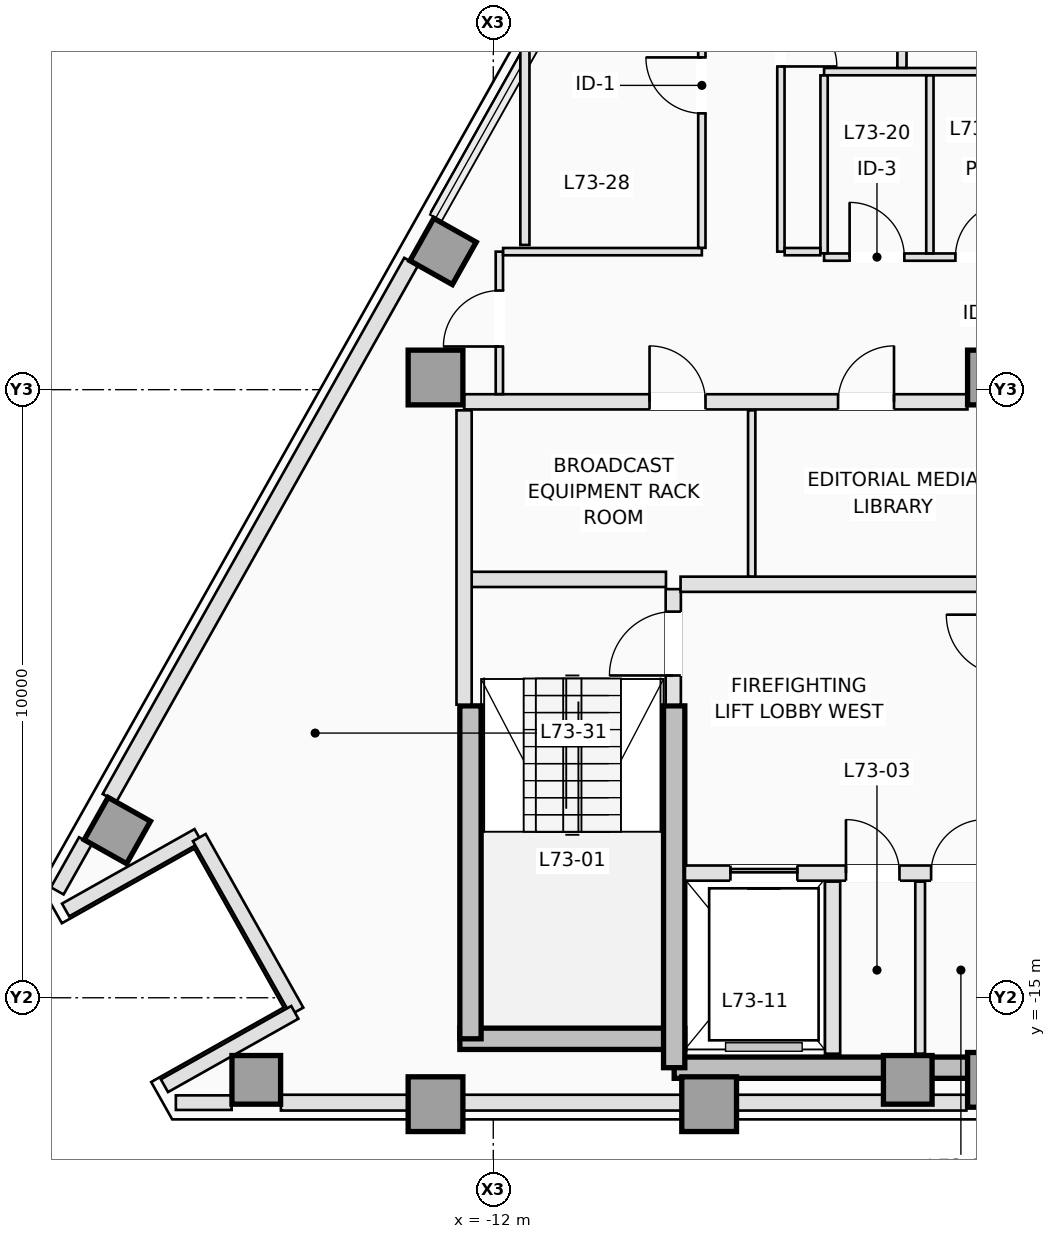
"""IFC4 building model, lengths in metres.
Left out: names, types, materials, properties, quantities, classifications, styles, units other than length and angle.
Written with IfcOpenShell. Run it as: python <this file> out.ifc"""

import sys

from ifc_helpers import new_model, si_unit, direction, frame, frame_2d, origin, origin_2d, place, context, subcontext, project, spatial, rectangle, extrude, element, fill, save


model = new_model("IFC4")
c1 = context("Model", 3, precision=1e-05, world=origin(), true_north=direction((0.0, 1.0)))
c2 = subcontext(c1, "Body", "Model", "MODEL_VIEW")
j1 = project(units=[si_unit("LENGTHUNIT", "METRE"), si_unit("PLANEANGLEUNIT", "RADIAN")], contexts=[c1])
p1 = place(None, origin())
s1 = spatial("IfcSite", under=j1, at=p1, CompositionType="ELEMENT")
p2 = place(p1, origin())
s2 = spatial("IfcBuilding", under=s1, at=p2, CompositionType="ELEMENT")
p3 = place(p2, frame((0.0, 0.0, 263.9)))
s3 = spatial("IfcBuildingStorey", under=s2, at=p3, CompositionType="ELEMENT", Elevation=263.9)
p4 = place(p3, frame((-12.55, -15.675, 0.0), z_axis=(0.0, 0.0, 1.0), x_axis=(1.0, 0.0, 0.0)))
e1 = element("IfcWall", 1, at=p4, inside=s3, PredefinedType="SHEAR", context=c2, shape_type="SweptSolid", body=[
    extrude(rectangle(XDim=3.7, YDim=0.35, at=frame_2d((1.85, 0.0))), origin(), (0.0, 0.0, 1.0), 3.5),
])
p5 = place(p3, frame((-9.025, -16.15, 0.0), z_axis=(0.0, 0.0, 1.0), x_axis=(1.0, 0.0, 0.0)))
e2 = element("IfcWall", 2, at=p5, inside=s3, PredefinedType="SHEAR", context=c2, shape_type="SweptSolid", body=[
    extrude(rectangle(XDim=5.275, YDim=0.35, at=frame_2d((2.637, 0.0))), origin(), (0.0, 0.0, 1.0), 3.5),
])
p6 = place(p3, frame((-12.375, -15.675, 0.0), z_axis=(0.0, 0.0, 1.0), x_axis=(0.0, 1.0, 0.0)))
e3 = element("IfcWall", 3, at=p6, inside=s3, PredefinedType="SHEAR", context=c2, shape_type="SweptSolid", body=[
    extrude(rectangle(XDim=5.475, YDim=0.35, at=frame_2d((2.738, 0.0))), origin(), (0.0, 0.0, 1.0), 3.5),
])
p7 = place(p3, frame((-9.025, -16.15, 0.0), z_axis=(0.0, 0.0, 1.0), x_axis=(0.0, 1.0, 0.0)))
e4 = element("IfcWall", 4, at=p7, inside=s3, PredefinedType="SHEAR", context=c2, shape_type="SweptSolid", body=[
    extrude(rectangle(XDim=5.95, YDim=0.35, at=frame_2d((2.975, 0.0))), origin(), (0.0, 0.0, 1.0), 3.5),
])
for number, where, z_axis, x_axis in (
    (5, (-12.95, -16.75, 0.0), (0.0, 0.0, 1.0), (1.0, 0.0, 0.0)),
    (6, (-8.45, -16.75, 0.0), (0.0, 0.0, 1.0), (1.0, 0.0, 0.0)),
    (7, (-3.75, -16.35, 0.0), (0.0, 0.0, 1.0), (1.0, 0.0, 0.0)),
    (8, (-12.95, -4.8, 0.0), (0.0, 0.0, 1.0), (1.0, 0.0, 0.0)),
    (9, (-3.75, -4.8, 0.0), (0.0, 0.0, 1.0), (1.0, 0.0, 0.0)),
):
    element("IfcColumn", number, at=place(p3, frame(where, z_axis=z_axis, x_axis=x_axis)), inside=s3, PredefinedType="COLUMN", context=c2, shape_type="SweptSolid", body=[
        extrude(rectangle(XDim=0.9, YDim=0.9, at=origin_2d()), origin(), (0.0, 0.0, 1.0), 3.5),
    ])
for number, where, z_axis, x_axis in (
    (10, (-15.898, -16.35, 0.0), (0.0, 0.0, 1.0), (0.0, 1.0, 0.0)),
    (11, (-5.184, -16.35, 0.0), (0.0, 0.0, 1.0), (0.0, 1.0, 0.0)),
    (12, (-12.825, -2.727, 0.0), (0.0, 0.0, 1.0), (-0.872, 0.49, 0.0)),
    (13, (-18.182, -12.25, 0.0), (0.0, 0.0, 1.0), (-0.872, 0.49, 0.0)),
):
    element("IfcColumn", number, at=place(p3, frame(where, z_axis=z_axis, x_axis=x_axis)), inside=s3, PredefinedType="COLUMN", context=c2, shape_type="SweptSolid", body=[
        extrude(rectangle(XDim=0.8, YDim=0.8, at=origin_2d()), origin(), (0.0, 0.0, 1.0), 3.5),
    ])
p8 = place(p3, frame((-16.302, -16.725, 0.0), z_axis=(0.0, 0.0, 1.0), x_axis=(-1.0, 0.0, 0.0)))
e14 = element("IfcWall", 14, at=p8, inside=s3, PredefinedType="STANDARD", context=c2, shape_type="SweptSolid", body=[
    extrude(rectangle(XDim=0.917, YDim=0.24, at=frame_2d((0.459, 0.0))), origin(), (0.0, 0.0, 1.0), 3.25),
])
p9 = place(p3, frame((-4.22, -16.725, 0.0), z_axis=(0.0, 0.0, 1.0), x_axis=(-1.0, 0.0, 0.0)))
e15 = element("IfcWall", 15, at=p9, inside=s3, PredefinedType="STANDARD", context=c2, shape_type="SweptSolid", body=[
    extrude(rectangle(XDim=11.273, YDim=0.26, at=frame_2d((5.636, 0.0))), origin(), (0.0, 0.0, 1.0), 2.79),
])
p10 = place(p3, frame((-19.171, -13.242, 0.0), z_axis=(0.0, 0.0, 1.0), x_axis=(0.490199895283, 0.871610040479, 0.0)))
e16 = element("IfcWall", 16, at=p10, inside=s3, PredefinedType="STANDARD", context=c2, shape_type="SweptSolid", body=[
    extrude(rectangle(XDim=0.945, YDim=0.24, at=frame_2d((0.472, 0.0))), origin(), (0.0, 0.0, 1.0), 3.25),
])
p11 = place(p3, frame((-18.311, -11.713, 0.0), z_axis=(0.0, 0.0, 1.0), x_axis=(0.490266968583, 0.871572314565, 0.0)))
e17 = element("IfcWall", 17, at=p11, inside=s3, PredefinedType="STANDARD", context=c2, shape_type="SweptSolid", body=[
    extrude(rectangle(XDim=10.116, YDim=0.26, at=frame_2d((5.058, 0.0))), origin(), (0.0, 0.0, 1.0), 3.25),
])
p12 = place(p3, frame((-19.033, -13.556, 0.0), z_axis=(0.0, 0.0, 1.0), x_axis=(0.871588577066, 0.490238056792, 0.0)))
e18 = element("IfcWall", 18, at=p12, inside=s3, PredefinedType="STANDARD", context=c2, shape_type="SweptSolid", body=[
    extrude(rectangle(XDim=2.5, YDim=0.24, at=frame_2d((1.25, 0.0))), origin(), (0.0, 0.0, 1.0), 3.25),
])
p13 = place(p3, frame((-16.835, -12.366, 0.0), z_axis=(0.0, 0.0, 1.0), x_axis=(0.490293083368, -0.871557624258, 0.0)))
e19 = element("IfcWall", 19, at=p13, inside=s3, PredefinedType="STANDARD", context=c2, shape_type="SweptSolid", body=[
    extrude(rectangle(XDim=3.276, YDim=0.24, at=frame_2d((1.638, 0.0))), origin(), (0.0, 0.0, 1.0), 2.79),
])
p14 = place(p3, frame((-15.264, -15.24, 0.0), z_axis=(0.0, 0.0, 1.0), x_axis=(-0.87157023615, -0.490270663468, 0.0)))
e20 = element("IfcWall", 20, at=p14, inside=s3, PredefinedType="STANDARD", context=c2, shape_type="SweptSolid", body=[
    extrude(rectangle(XDim=2.46, YDim=0.24, at=frame_2d((1.23, 0.0))), origin(), (0.0, 0.0, 1.0), 3.25),
])
p15 = place(p3, frame((-9.04, -10.18, 0.0), z_axis=(0.0, 0.0, 1.0), x_axis=(0.0, 1.0, 0.0)))
e21 = element("IfcWall", 21, at=p15, inside=s3, PredefinedType="PARTITIONING", context=c2, shape_type="SweptSolid", body=[
    extrude(rectangle(XDim=1.9, YDim=0.25, at=frame_2d((0.95, 0.0))), origin(), (0.0, 0.0, 1.0), 3.25),
])
p16 = place(p15, frame((0.48, 0.0, 0.0)))
e22 = element("IfcOpeningElement", 22, at=p16, cuts=e21, PredefinedType="OPENING", context=c2, shape_type="SweptSolid", body=[
    extrude(rectangle(XDim=1.05, YDim=2.15, at=frame_2d((0.525, 1.075))), frame((0.0, 0.135, 0.0), z_axis=(0.0, -1.0, 0.0), x_axis=(1.0, 0.0, 0.0)), (0.0, 0.0, 1.0), 0.27),
])
p17 = place(p3, frame((-12.38, -8.12, 0.0), z_axis=(0.0, 0.0, 1.0), x_axis=(1.0, 0.0, 0.0)))
e23 = element("IfcWall", 23, at=p17, inside=s3, PredefinedType="PARTITIONING", context=c2, shape_type="SweptSolid", body=[
    extrude(rectangle(XDim=3.22, YDim=0.25, at=frame_2d((1.61, 0.0))), origin(), (0.0, 0.0, 1.0), 3.25),
])
p18 = place(p3, frame((-12.48, -10.18, 0.0), z_axis=(0.0, 0.0, 1.0), x_axis=(0.0, 1.0, 0.0)))
e24 = element("IfcWall", 24, at=p18, inside=s3, PredefinedType="PARTITIONING", context=c2, shape_type="SweptSolid", body=[
    extrude(rectangle(XDim=4.84, YDim=0.25, at=frame_2d((2.42, 0.0))), origin(), (0.0, 0.0, 1.0), 3.25),
])
p19 = place(p3, frame((-8.848, -12.95, 0.0), z_axis=(0.0, 0.0, 1.0), x_axis=(1.0, 0.0, 0.0)))
e25 = element("IfcWall", 25, at=p19, inside=s3, PredefinedType="PARTITIONING", context=c2, shape_type="SweptSolid", body=[
    extrude(rectangle(XDim=5.168, YDim=0.25, at=frame_2d((2.584, 0.0))), origin(), (0.0, 0.0, 1.0), 3.25),
])
p20 = place(p19, frame((0.748, 0.0, 0.0)))
e26 = element("IfcOpeningElement", 26, at=p20, cuts=e25, PredefinedType="OPENING", context=c2, shape_type="SweptSolid", body=[
    extrude(rectangle(XDim=1.1, YDim=2.15, at=frame_2d((0.55, 1.075))), frame((0.0, 0.135, 0.0), z_axis=(0.0, -1.0, 0.0), x_axis=(1.0, 0.0, 0.0)), (0.0, 0.0, 1.0), 0.27),
])
p21 = place(p19, frame((2.648, 0.0, 0.0)))
e27 = element("IfcOpeningElement", 27, at=p21, cuts=e25, PredefinedType="OPENING", context=c2, shape_type="SweptSolid", body=[
    extrude(rectangle(XDim=0.88, YDim=2.1, at=frame_2d((0.44, 1.05))), frame((0.0, 0.135, 0.0), z_axis=(0.0, -1.0, 0.0), x_axis=(1.0, 0.0, 0.0)), (0.0, 0.0, 1.0), 0.27),
])
p22 = place(p19, frame((4.048, 0.0, 0.0)))
e28 = element("IfcOpeningElement", 28, at=p22, cuts=e25, PredefinedType="OPENING", context=c2, shape_type="SweptSolid", body=[
    extrude(rectangle(XDim=0.88, YDim=2.1, at=frame_2d((0.44, 1.05))), frame((0.0, 0.135, 0.0), z_axis=(0.0, -1.0, 0.0), x_axis=(1.0, 0.0, 0.0)), (0.0, 0.0, 1.0), 0.27),
])
p23 = place(p3, frame((-6.42, -15.92, 0.0), z_axis=(0.0, 0.0, 1.0), x_axis=(0.0, 1.0, 0.0)))
e29 = element("IfcWall", 29, at=p23, inside=s3, PredefinedType="PARTITIONING", context=c2, shape_type="SweptSolid", body=[
    extrude(rectangle(XDim=2.83, YDim=0.25, at=frame_2d((1.415, 0.0))), origin(), (0.0, 0.0, 1.0), 3.25),
])
p24 = place(p3, frame((-4.98, -15.92, 0.0), z_axis=(0.0, 0.0, 1.0), x_axis=(0.0, 1.0, 0.0)))
e30 = element("IfcWall", 30, at=p24, inside=s3, PredefinedType="PARTITIONING", context=c2, shape_type="SweptSolid", body=[
    extrude(rectangle(XDim=2.83, YDim=0.16, at=frame_2d((1.415, 0.0))), origin(), (0.0, 0.0, 1.0), 3.25),
])
p25 = place(p3, frame((-8.92, -8.2, 0.0), z_axis=(0.0, 0.0, 1.0), x_axis=(1.0, 0.0, 0.0)))
e31 = element("IfcWall", 31, at=p25, inside=s3, PredefinedType="PARTITIONING", context=c2, shape_type="SweptSolid", body=[
    extrude(rectangle(XDim=5.24, YDim=0.25, at=frame_2d((2.62, 0.0))), origin(), (0.0, 0.0, 1.0), 3.25),
])
p26 = place(p3, frame((-12.48, -5.2, 0.0), z_axis=(0.0, 0.0, 1.0), x_axis=(1.0, 0.0, 0.0)))
e32 = element("IfcWall", 32, at=p26, inside=s3, PredefinedType="PARTITIONING", context=c2, shape_type="SweptSolid", body=[
    extrude(rectangle(XDim=8.278, YDim=0.25, at=frame_2d((4.139, 0.0))), origin(), (0.0, 0.0, 1.0), 3.25),
])
p27 = place(p26, frame((3.05, 0.0, 0.0)))
e33 = element("IfcOpeningElement", 33, at=p27, cuts=e32, PredefinedType="OPENING", context=c2, shape_type="SweptSolid", body=[
    extrude(rectangle(XDim=0.92, YDim=2.12, at=frame_2d((0.46, 1.06))), frame((0.0, 0.135, 0.0), z_axis=(0.0, -1.0, 0.0), x_axis=(1.0, 0.0, 0.0)), (0.0, 0.0, 1.0), 0.27),
])
p28 = place(p26, frame((6.15, 0.0, 0.0)))
e34 = element("IfcOpeningElement", 34, at=p28, cuts=e32, PredefinedType="OPENING", context=c2, shape_type="SweptSolid", body=[
    extrude(rectangle(XDim=0.92, YDim=2.12, at=frame_2d((0.46, 1.06))), frame((0.0, 0.135, 0.0), z_axis=(0.0, -1.0, 0.0), x_axis=(1.0, 0.0, 0.0)), (0.0, 0.0, 1.0), 0.27),
])
p29 = place(p3, frame((-7.75, -8.073, 0.0), z_axis=(0.0, 0.0, 1.0), x_axis=(0.0, 1.0, 0.0)))
e35 = element("IfcWall", 35, at=p29, inside=s3, PredefinedType="PARTITIONING", context=c2, shape_type="SweptSolid", body=[
    extrude(rectangle(XDim=2.733, YDim=0.12, at=frame_2d((1.366, 0.0))), origin(), (0.0, 0.0, 1.0), 3.25),
])
p30 = place(p3, frame((-6.56, -2.82, 0.0), z_axis=(0.0, 0.0, 1.0), x_axis=(1.0, 0.0, 0.0)))
e36 = element("IfcWall", 36, at=p30, inside=s3, PredefinedType="PARTITIONING", context=c2, shape_type="SweptSolid", body=[
    extrude(rectangle(XDim=5.32, YDim=0.12, at=frame_2d((2.66, 0.0))), origin(), (0.0, 0.0, 1.0), 2.943),
])
p31 = place(p30, frame((0.42, 0.0, 0.0)))
e37 = element("IfcOpeningElement", 37, at=p31, cuts=e36, PredefinedType="OPENING", context=c2, shape_type="SweptSolid", body=[
    extrude(rectangle(XDim=0.9, YDim=2.12, at=frame_2d((0.45, 1.06))), frame((0.0, 0.07, 0.0), z_axis=(0.0, -1.0, 0.0), x_axis=(1.0, 0.0, 0.0)), (0.0, 0.0, 1.0), 0.14),
])
p32 = place(p30, frame((2.16, 0.0, 0.0)))
e38 = element("IfcOpeningElement", 38, at=p32, cuts=e36, PredefinedType="OPENING", context=c2, shape_type="SweptSolid", body=[
    extrude(rectangle(XDim=0.9, YDim=2.12, at=frame_2d((0.45, 1.06))), frame((0.0, 0.07, 0.0), z_axis=(0.0, -1.0, 0.0), x_axis=(1.0, 0.0, 0.0)), (0.0, 0.0, 1.0), 0.14),
])
p33 = place(p30, frame((3.92, 0.0, 0.0)))
e39 = element("IfcOpeningElement", 39, at=p33, cuts=e36, PredefinedType="OPENING", context=c2, shape_type="SweptSolid", body=[
    extrude(rectangle(XDim=0.9, YDim=2.12, at=frame_2d((0.45, 1.06))), frame((0.0, 0.07, 0.0), z_axis=(0.0, -1.0, 0.0), x_axis=(1.0, 0.0, 0.0)), (0.0, 0.0, 1.0), 0.14),
])
p34 = place(p3, frame((-6.56, 0.23, 0.0), z_axis=(0.0, 0.0, 1.0), x_axis=(1.0, 0.0, 0.0)))
e40 = element("IfcWall", 40, at=p34, inside=s3, PredefinedType="PARTITIONING", context=c2, shape_type="SweptSolid", body=[
    extrude(rectangle(XDim=5.32, YDim=0.12, at=frame_2d((2.66, 0.0))), origin(), (0.0, 0.0, 1.0), 3.25),
])
for number, where, z_axis, x_axis in (
    (41, (-6.56, -2.758, 0.0), (0.0, 0.0, 1.0), (0.0, 1.0, 0.0)),
    (42, (-4.82, -2.758, 0.0), (0.0, 0.0, 1.0), (0.0, 1.0, 0.0)),
):
    element("IfcWall", number, at=place(p3, frame(where, z_axis=z_axis, x_axis=x_axis)), inside=s3, PredefinedType="PARTITIONING", context=c2, shape_type="SweptSolid", body=[
        extrude(rectangle(XDim=2.926, YDim=0.12, at=frame_2d((1.463, 0.0))), origin(), (0.0, 0.0, 1.0), 3.25),
    ])
p35 = place(p3, frame((-11.9, -5.073, 0.0), z_axis=(0.0, 0.0, 1.0), x_axis=(0.0, 1.0, 0.0)))
e43 = element("IfcWall", 43, at=p35, inside=s3, PredefinedType="PARTITIONING", context=c2, shape_type="SweptSolid", body=[
    extrude(rectangle(XDim=2.343, YDim=0.12, at=frame_2d((1.171, 0.0))), origin(), (0.0, 0.0, 1.0), 3.25),
])
p36 = place(p35, frame((0.783, 0.0, 0.0)))
e44 = element("IfcOpeningElement", 44, at=p36, cuts=e43, PredefinedType="OPENING", context=c2, shape_type="SweptSolid", body=[
    extrude(rectangle(XDim=0.92, YDim=2.12, at=frame_2d((0.46, 1.06))), frame((0.0, 0.07, 0.0), z_axis=(0.0, -1.0, 0.0), x_axis=(1.0, 0.0, 0.0)), (0.0, 0.0, 1.0), 0.14),
])
p37 = place(p3, frame((-11.838, -2.73, 0.0), z_axis=(0.0, 0.0, 1.0), x_axis=(1.0, 0.0, 0.0)))
e45 = element("IfcWall", 45, at=p37, inside=s3, PredefinedType="PARTITIONING", context=c2, shape_type="SweptSolid", body=[
    extrude(rectangle(XDim=3.268, YDim=0.12, at=frame_2d((1.634, 0.0))), origin(), (0.0, 0.0, 1.0), 3.25),
])
p38 = place(p3, frame((-8.57, -2.668, 0.0), z_axis=(0.0, 0.0, 1.0), x_axis=(0.0, 1.0, 0.0)))
e46 = element("IfcWall", 46, at=p38, inside=s3, PredefinedType="PARTITIONING", context=c2, shape_type="SweptSolid", body=[
    extrude(rectangle(XDim=5.997, YDim=0.12, at=frame_2d((2.999, 0.0))), origin(), (0.0, 0.0, 1.0), 3.25),
])
p39 = place(p38, frame((2.212, 0.0, 0.0)))
e47 = element("IfcOpeningElement", 47, at=p39, cuts=e46, PredefinedType="OPENING", context=c2, shape_type="SweptSolid", body=[
    extrude(rectangle(XDim=0.92, YDim=2.12, at=frame_2d((0.46, 1.06))), frame((0.0, 0.07, 0.0), z_axis=(0.0, -1.0, 0.0), x_axis=(1.0, 0.0, 0.0)), (0.0, 0.0, 1.0), 0.14),
])
p40 = place(p3, frame((-7.27, 3.498, 0.0), z_axis=(0.0, 0.0, 1.0), x_axis=(0.0, -1.0, 0.0)))
e48 = element("IfcWall", 48, at=p40, inside=s3, PredefinedType="PARTITIONING", context=c2, shape_type="SweptSolid", body=[
    extrude(rectangle(XDim=6.228, YDim=0.12, at=frame_2d((3.114, 0.0))), origin(), (0.0, 0.0, 1.0), 3.25),
])
p41 = place(p40, frame((2.263, 0.0, 0.0)))
e49 = element("IfcOpeningElement", 49, at=p41, cuts=e48, PredefinedType="OPENING", context=c2, shape_type="SweptSolid", body=[
    extrude(rectangle(XDim=0.92, YDim=2.12, at=frame_2d((0.46, 1.06))), frame((0.0, 0.07, 0.0), z_axis=(0.0, -1.0, 0.0), x_axis=(1.0, 0.0, 0.0)), (0.0, 0.0, 1.0), 0.14),
])
p42 = place(p3, frame((-7.208, -2.73, 0.0), z_axis=(0.0, 0.0, 1.0), x_axis=(1.0, 0.0, 0.0)))
e50 = element("IfcWall", 50, at=p42, inside=s3, PredefinedType="PARTITIONING", context=c2, shape_type="SweptSolid", body=[
    extrude(rectangle(XDim=0.586, YDim=0.12, at=frame_2d((0.293, 0.0))), origin(), (0.0, 0.0, 1.0), 3.25),
])
p43 = place(p3, frame((-5.28, 0.292, 0.0), z_axis=(0.0, 0.0, 1.0), x_axis=(0.003540480305, 0.99999373248, 0.0)))
e51 = element("IfcWall", 51, at=p43, inside=s3, PredefinedType="PARTITIONING", context=c2, shape_type="SweptSolid", body=[
    extrude(rectangle(XDim=11.447, YDim=0.15, at=frame_2d((5.723, 0.0))), origin(), (0.0, 0.0, 1.0), 3.25),
])
p44 = place(p3, frame((-11.48, -2.62, 0.0), z_axis=(0.0, 0.0, 1.0), x_axis=(0.0, 1.0, 0.0)))
e52 = element("IfcWall", 52, at=p44, inside=s3, PredefinedType="PARTITIONING", context=c2, shape_type="SweptSolid", body=[
    extrude(rectangle(XDim=3.264, YDim=0.15, at=frame_2d((1.632, 0.0))), origin(), (0.0, 0.0, 1.0), 3.25),
])
p45 = place(p20, origin())
e53 = element("IfcDoor", 53, at=p45, inside=s3, OperationType="SLIDING_TO_LEFT", PredefinedType="DOOR", context=c2, shape_type="SweptSolid", body=[
    extrude(rectangle(XDim=1.1, YDim=2.15, at=frame_2d((0.55, 1.075))), frame((0.0, 0.025, 0.0), z_axis=(0.0, -1.0, 0.0), x_axis=(1.0, 0.0, 0.0)), (0.0, 0.0, 1.0), 0.05),
])
fill(e26, e53)
p46 = place(p16, origin())
e54 = element("IfcDoor", 54, at=p46, inside=s3, OperationType="SINGLE_SWING_LEFT", PredefinedType="DOOR", context=c2, shape_type="SweptSolid", body=[
    extrude(rectangle(XDim=1.05, YDim=2.15, at=frame_2d((0.525, 1.075))), frame((0.0, 0.025, 0.0), z_axis=(0.0, -1.0, 0.0), x_axis=(1.0, 0.0, 0.0)), (0.0, 0.0, 1.0), 0.05),
])
fill(e22, e54)
p47 = place(p21, origin())
e55 = element("IfcDoor", 55, at=p47, inside=s3, OperationType="SINGLE_SWING_LEFT", PredefinedType="TRAPDOOR", context=c2, shape_type="SweptSolid", body=[
    extrude(rectangle(XDim=0.88, YDim=2.1, at=frame_2d((0.44, 1.05))), frame((0.0, 0.025, 0.0), z_axis=(0.0, -1.0, 0.0), x_axis=(1.0, 0.0, 0.0)), (0.0, 0.0, 1.0), 0.05),
])
fill(e27, e55)
p48 = place(p22, origin())
e56 = element("IfcDoor", 56, at=p48, inside=s3, OperationType="SINGLE_SWING_RIGHT", PredefinedType="TRAPDOOR", context=c2, shape_type="SweptSolid", body=[
    extrude(rectangle(XDim=0.88, YDim=2.1, at=frame_2d((0.44, 1.05))), frame((0.0, 0.025, 0.0), z_axis=(0.0, -1.0, 0.0), x_axis=(1.0, 0.0, 0.0)), (0.0, 0.0, 1.0), 0.05),
])
fill(e28, e56)
p49 = place(p27, origin())
e57 = element("IfcDoor", 57, at=p49, inside=s3, OperationType="SINGLE_SWING_LEFT", PredefinedType="DOOR", context=c2, shape_type="SweptSolid", body=[
    extrude(rectangle(XDim=0.92, YDim=2.12, at=frame_2d((0.46, 1.06))), frame((0.0, 0.025, 0.0), z_axis=(0.0, -1.0, 0.0), x_axis=(1.0, 0.0, 0.0)), (0.0, 0.0, 1.0), 0.05),
])
fill(e33, e57)
p50 = place(p28, origin())
e58 = element("IfcDoor", 58, at=p50, inside=s3, OperationType="SINGLE_SWING_RIGHT", PredefinedType="DOOR", context=c2, shape_type="SweptSolid", body=[
    extrude(rectangle(XDim=0.92, YDim=2.12, at=frame_2d((0.46, 1.06))), frame((0.0, 0.025, 0.0), z_axis=(0.0, -1.0, 0.0), x_axis=(1.0, 0.0, 0.0)), (0.0, 0.0, 1.0), 0.05),
])
fill(e34, e58)
p51 = place(p31, origin())
e59 = element("IfcDoor", 59, at=p51, inside=s3, OperationType="SINGLE_SWING_LEFT", PredefinedType="DOOR", context=c2, shape_type="SweptSolid", body=[
    extrude(rectangle(XDim=0.9, YDim=2.12, at=frame_2d((0.45, 1.06))), frame((0.0, 0.025, 0.0), z_axis=(0.0, -1.0, 0.0), x_axis=(1.0, 0.0, 0.0)), (0.0, 0.0, 1.0), 0.05),
])
fill(e37, e59)
p52 = place(p32, origin())
e60 = element("IfcDoor", 60, at=p52, inside=s3, OperationType="SINGLE_SWING_RIGHT", PredefinedType="DOOR", context=c2, shape_type="SweptSolid", body=[
    extrude(rectangle(XDim=0.9, YDim=2.12, at=frame_2d((0.45, 1.06))), frame((0.0, 0.025, 0.0), z_axis=(0.0, -1.0, 0.0), x_axis=(1.0, 0.0, 0.0)), (0.0, 0.0, 1.0), 0.05),
])
fill(e38, e60)
p53 = place(p41, origin())
e61 = element("IfcDoor", 61, at=p53, inside=s3, OperationType="SINGLE_SWING_RIGHT", PredefinedType="DOOR", context=c2, shape_type="SweptSolid", body=[
    extrude(rectangle(XDim=0.92, YDim=2.12, at=frame_2d((0.46, 1.06))), frame((0.0, 0.025, 0.0), z_axis=(0.0, -1.0, 0.0), x_axis=(1.0, 0.0, 0.0)), (0.0, 0.0, 1.0), 0.05),
])
fill(e49, e61)
p54 = place(p39, origin())
e62 = element("IfcDoor", 62, at=p54, inside=s3, OperationType="SINGLE_SWING_RIGHT", PredefinedType="DOOR", context=c2, shape_type="SweptSolid", body=[
    extrude(rectangle(XDim=0.92, YDim=2.12, at=frame_2d((0.46, 1.06))), frame((0.0, 0.025, 0.0), z_axis=(0.0, -1.0, 0.0), x_axis=(1.0, 0.0, 0.0)), (0.0, 0.0, 1.0), 0.05),
])
fill(e47, e62)
p55 = place(p36, origin())
e63 = element("IfcDoor", 63, at=p55, inside=s3, OperationType="SINGLE_SWING_LEFT", PredefinedType="DOOR", context=c2, shape_type="SweptSolid", body=[
    extrude(rectangle(XDim=0.92, YDim=2.12, at=frame_2d((0.46, 1.06))), frame((0.0, 0.025, 0.0), z_axis=(0.0, -1.0, 0.0), x_axis=(1.0, 0.0, 0.0)), (0.0, 0.0, 1.0), 0.05),
])
fill(e44, e63)
save(model, sys.argv[1])
